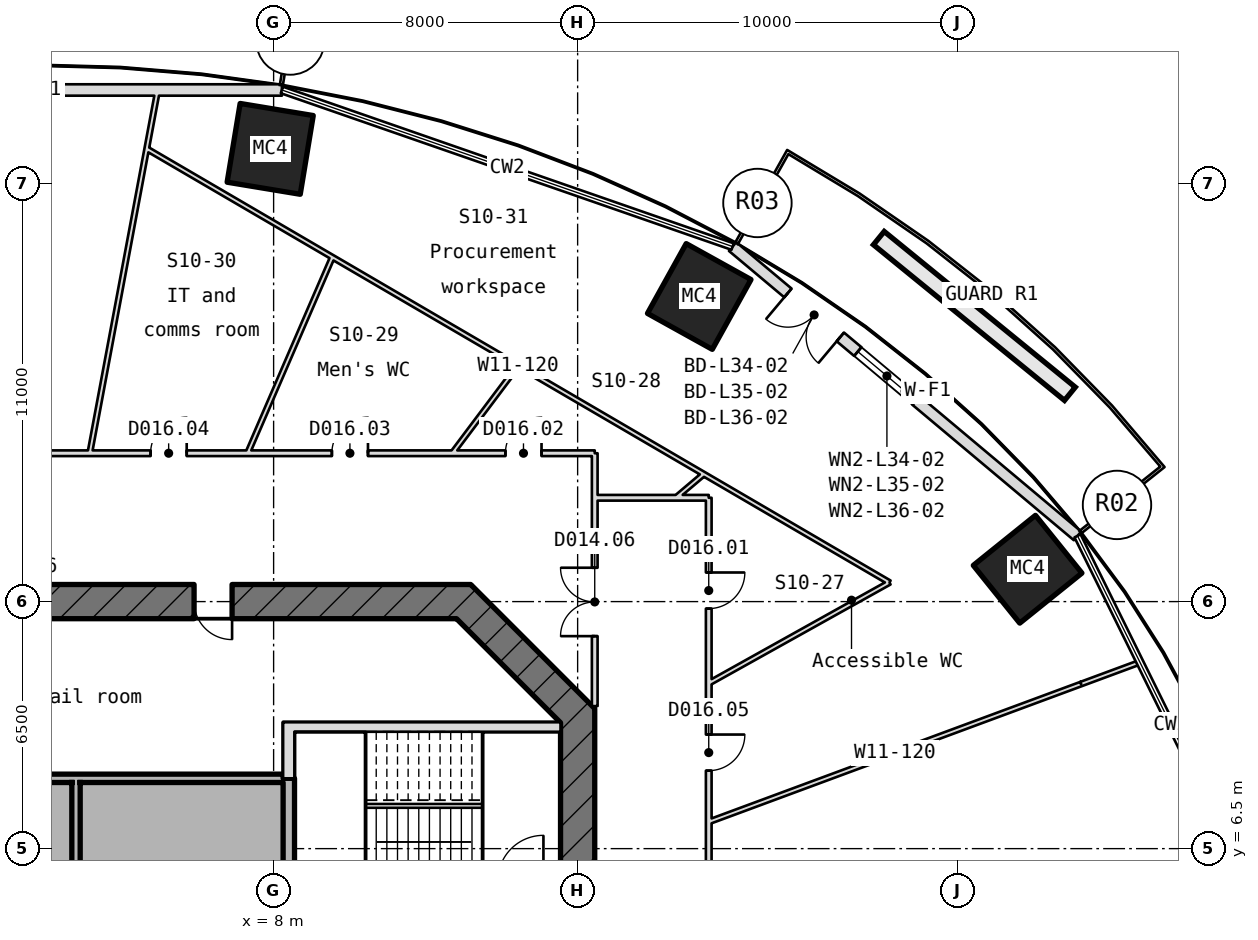
"""IFC4 building model, lengths in metres.
Left out: names, types, materials, properties, quantities, classifications, styles, units other than length and angle.
Written with IfcOpenShell. Run it as: python <this file> out.ifc"""

import sys

from ifc_helpers import new_model, si_unit, direction, frame, frame_2d, origin, origin_2d, place, context, subcontext, project, spatial, rectangle, hollow_rectangle, extrude, element, fill, save


model = new_model("IFC4")
c1 = context("Model", 3, precision=1e-05, world=origin(), true_north=direction((0.0, 1.0)))
c2 = subcontext(c1, "Body", "Model", "MODEL_VIEW")
j1 = project(units=[si_unit("LENGTHUNIT", "METRE"), si_unit("PLANEANGLEUNIT", "RADIAN")], contexts=[c1])
p1 = place(None, origin())
s1 = spatial("IfcSite", under=j1, at=p1, CompositionType="ELEMENT")
p2 = place(p1, origin())
s2 = spatial("IfcBuilding", under=s1, at=p2, CompositionType="ELEMENT")
p3 = place(p2, frame((0.0, 0.0, 161.05)))
s3 = spatial("IfcBuildingStorey", under=s2, at=p3, CompositionType="ELEMENT", Elevation=161.05)
for number, where, z_axis, x_axis in (
    (1, (27.841, 13.852, -0.18), (0.0, 0.0, 1.0), (0.627, -0.779, 0.0)),
    (2, (19.2, 21.028, -0.18), (0.0, 0.0, 1.0), (0.874, -0.485, 0.0)),
    (3, (7.91, 24.912, -0.18), (0.0, 0.0, 1.0), (0.987, -0.163, 0.0)),
):
    element("IfcColumn", number, at=place(p3, frame(where, z_axis=z_axis, x_axis=x_axis)), inside=s3, PredefinedType="COLUMN", context=c2, shape_type="SweptSolid", body=[
        extrude(hollow_rectangle(XDim=1.95, YDim=2.1, WallThickness=0.075, at=origin_2d()), origin(), (0.0, 0.0, 1.0), 4.15),
    ])
p4 = place(p3, frame((29.155, 14.729, 0.0), z_axis=(0.0, 0.0, 1.0), x_axis=(-0.766205617694, 0.642595480387, 0.0)))
e4 = element("IfcWall", 4, at=p4, inside=s3, PredefinedType="SOLIDWALL", context=c2, shape_type="SweptSolid", body=[
    extrude(rectangle(XDim=11.847, YDim=0.3, at=frame_2d((5.923, 0.0))), origin(), (0.0, 0.0, 1.0), 3.97),
])
p5 = place(p4, frame((8.146, 0.0, 0.0)))
e5 = element("IfcOpeningElement", 5, at=p5, cuts=e4, PredefinedType="OPENING", context=c2, shape_type="SweptSolid", body=[
    extrude(rectangle(XDim=1.8, YDim=2.4, at=frame_2d((0.9, 1.2))), frame((0.0, 0.16, 0.0), z_axis=(0.0, -1.0, 0.0), x_axis=(1.0, 0.0, 0.0)), (0.0, 0.0, 1.0), 0.32),
])
p6 = place(p4, frame((5.546, 0.0, 0.9)))
e6 = element("IfcOpeningElement", 6, at=p6, cuts=e4, PredefinedType="OPENING", context=c2, shape_type="SweptSolid", body=[
    extrude(rectangle(XDim=2.0, YDim=1.5, at=frame_2d((1.0, 0.75))), frame((0.0, 0.16, 0.0), z_axis=(0.0, -1.0, 0.0), x_axis=(1.0, 0.0, 0.0)), (0.0, 0.0, 1.0), 0.32),
])
p7 = place(p3, frame((8.218, 26.462, 0.0), z_axis=(0.0, 0.0, 1.0), x_axis=(-1.0, 0.0, 0.0)))
e7 = element("IfcWall", 7, at=p7, inside=s3, PredefinedType="SOLIDWALL", context=c2, shape_type="SweptSolid", body=[
    extrude(rectangle(XDim=12.837, YDim=0.3, at=frame_2d((6.418, 0.0))), origin(), (0.0, 0.0, 1.0), 3.97),
])
p8 = place(p7, frame((9.137, 0.0, 0.0)))
e8 = element("IfcOpeningElement", 8, at=p8, cuts=e7, PredefinedType="OPENING", context=c2, shape_type="SweptSolid", body=[
    extrude(rectangle(XDim=1.8, YDim=2.4, at=frame_2d((0.9, 1.2))), frame((0.0, 0.16, 0.0), z_axis=(0.0, -1.0, 0.0), x_axis=(1.0, 0.0, 0.0)), (0.0, 0.0, 1.0), 0.32),
])
p9 = place(p7, frame((6.537, 0.0, 0.9)))
e9 = element("IfcOpeningElement", 9, at=p9, cuts=e7, PredefinedType="OPENING", context=c2, shape_type="SweptSolid", body=[
    extrude(rectangle(XDim=2.0, YDim=1.5, at=frame_2d((1.0, 0.75))), frame((0.0, 0.16, 0.0), z_axis=(0.0, -1.0, 0.0), x_axis=(1.0, 0.0, 0.0)), (0.0, 0.0, 1.0), 0.32),
])
p10 = place(p3, frame((16.0, -10.186, -0.18), z_axis=(0.0, 0.0, 1.0), x_axis=(0.0, 1.0, 0.0)))
e10 = element("IfcWall", 10, at=p10, inside=s3, PredefinedType="SHEAR", context=c2, shape_type="SweptSolid", body=[
    extrude(rectangle(XDim=20.373, YDim=0.9, at=frame_2d((10.186, 0.0))), origin(), (0.0, 0.0, 1.0), 4.15),
])
p11 = place(p10, frame((8.986, 0.0, 0.18)))
e11 = element("IfcOpeningElement", 11, at=p11, cuts=e10, PredefinedType="OPENING", context=c2, shape_type="SweptSolid", body=[
    extrude(rectangle(XDim=2.4, YDim=2.1, at=frame_2d((1.2, 1.05))), frame((0.0, 0.46, 0.0), z_axis=(0.0, -1.0, 0.0), x_axis=(1.0, 0.0, 0.0)), (0.0, 0.0, 1.0), 0.92),
])
p12 = place(p10, frame((13.586, 0.0, 0.18)))
e12 = element("IfcOpeningElement", 12, at=p12, cuts=e10, PredefinedType="OPENING", context=c2, shape_type="SweptSolid", body=[
    extrude(rectangle(XDim=1.2, YDim=2.1, at=frame_2d((0.6, 1.05))), frame((0.0, 0.46, 0.0), z_axis=(0.0, -1.0, 0.0), x_axis=(1.0, 0.0, 0.0)), (0.0, 0.0, 1.0), 0.92),
])
p13 = place(p3, frame((16.132, 9.868, -0.18), z_axis=(0.0, 0.0, 1.0), x_axis=(-0.707106781187, 0.707106781187, 0.0)))
e13 = element("IfcWall", 13, at=p13, inside=s3, PredefinedType="SHEAR", context=c2, shape_type="SweptSolid", body=[
    extrude(rectangle(XDim=4.615, YDim=0.9, at=frame_2d((2.308, 0.0))), origin(), (0.0, 0.0, 1.0), 4.15),
])
p14 = place(p3, frame((13.186, 13.0, -0.18), z_axis=(0.0, 0.0, 1.0), x_axis=(-1.0, 0.0, 0.0)))
e14 = element("IfcWall", 14, at=p14, inside=s3, PredefinedType="SHEAR", context=c2, shape_type="SweptSolid", body=[
    extrude(rectangle(XDim=26.373, YDim=0.9, at=frame_2d((13.186, 0.0))), origin(), (0.0, 0.0, 1.0), 4.15),
])
p15 = place(p14, frame((19.094, 0.0, 0.18)))
e15 = element("IfcOpeningElement", 15, at=p15, cuts=e14, PredefinedType="OPENING", context=c2, shape_type="SweptSolid", body=[
    extrude(rectangle(XDim=1.0, YDim=2.1, at=frame_2d((0.5, 1.05))), frame((0.0, 0.46, 0.0), z_axis=(0.0, -1.0, 0.0), x_axis=(1.0, 0.0, 0.0)), (0.0, 0.0, 1.0), 0.92),
])
p16 = place(p14, frame((6.279, 0.0, 0.18)))
e16 = element("IfcOpeningElement", 16, at=p16, cuts=e14, PredefinedType="OPENING", context=c2, shape_type="SweptSolid", body=[
    extrude(rectangle(XDim=1.0, YDim=2.1, at=frame_2d((0.5, 1.05))), frame((0.0, 0.46, 0.0), z_axis=(0.0, -1.0, 0.0), x_axis=(1.0, 0.0, 0.0)), (0.0, 0.0, 1.0), 0.92),
])
p17 = place(p3, frame((-8.25, 8.35, 0.0), z_axis=(0.0, 0.0, 1.0), x_axis=(1.0, 0.0, 0.0)))
e17 = element("IfcWall", 17, at=p17, inside=s3, PredefinedType="STANDARD", context=c2, shape_type="SweptSolid", body=[
    extrude(rectangle(XDim=16.5, YDim=0.22, at=frame_2d((8.25, 0.0))), origin(), (0.0, 0.0, 1.0), 3.97),
])
p18 = place(p3, frame((8.55, 9.7, -0.18), z_axis=(0.0, 0.0, 1.0), x_axis=(1.0, 0.0, 0.0)))
e18 = element("IfcWall", 18, at=p18, inside=s3, PredefinedType="SHEAR", context=c2, shape_type="SweptSolid", body=[
    extrude(rectangle(XDim=7.0, YDim=0.25, at=frame_2d((3.5, 0.0))), origin(), (0.0, 0.0, 1.0), 4.15),
])
p19 = place(p3, frame((2.8, 5.46, 0.0), z_axis=(0.0, 0.0, 1.0), x_axis=(0.0, 1.0, 0.0)))
e19 = element("IfcWall", 19, at=p19, inside=s3, PredefinedType="STANDARD", context=c2, shape_type="SweptSolid", body=[
    extrude(rectangle(XDim=2.78, YDim=0.22, at=frame_2d((1.39, 0.0))), origin(), (0.0, 0.0, 1.0), 3.97),
])
p20 = place(p3, frame((8.4, 5.24, -0.18), z_axis=(0.0, 0.0, 1.0), x_axis=(0.0, 1.0, 0.0)))
e20 = element("IfcWall", 20, at=p20, inside=s3, PredefinedType="SHEAR", context=c2, shape_type="SweptSolid", body=[
    extrude(rectangle(XDim=3.11, YDim=0.3, at=frame_2d((1.555, 0.0))), origin(), (0.0, 0.0, 1.0), 4.15),
])
p21 = place(p3, frame((8.4, 8.35, -0.18), z_axis=(0.0, 0.0, 1.0), x_axis=(0.0, 1.0, 0.0)))
e21 = element("IfcWall", 21, at=p21, inside=s3, PredefinedType="SHEAR", context=c2, shape_type="SweptSolid", body=[
    extrude(rectangle(XDim=1.475, YDim=0.3, at=frame_2d((0.737, 0.0))), origin(), (0.0, 0.0, 1.0), 4.15),
])
p22 = place(p3, frame((-16.45, 16.904, 0.0), z_axis=(0.0, 0.0, 1.0), x_axis=(1.0, 0.0, 0.0)))
e22 = element("IfcWall", 22, at=p22, inside=s3, PredefinedType="PARTITIONING", context=c2, shape_type="SweptSolid", body=[
    extrude(rectangle(XDim=32.9, YDim=0.15, at=frame_2d((16.45, 0.0))), origin(), (0.0, 0.0, 1.0), 3.97),
])
p23 = place(p22, frame((30.55, 0.0, 0.0)))
e23 = element("IfcOpeningElement", 23, at=p23, cuts=e22, PredefinedType="OPENING", context=c2, shape_type="SweptSolid", body=[
    extrude(rectangle(XDim=0.95, YDim=2.1, at=frame_2d((0.475, 1.05))), frame((0.0, 0.085, 0.0), z_axis=(0.0, -1.0, 0.0), x_axis=(1.0, 0.0, 0.0)), (0.0, 0.0, 1.0), 0.17),
])
p24 = place(p22, frame((25.983, 0.0, 0.0)))
e24 = element("IfcOpeningElement", 24, at=p24, cuts=e22, PredefinedType="OPENING", context=c2, shape_type="SweptSolid", body=[
    extrude(rectangle(XDim=0.95, YDim=2.1, at=frame_2d((0.475, 1.05))), frame((0.0, 0.085, 0.0), z_axis=(0.0, -1.0, 0.0), x_axis=(1.0, 0.0, 0.0)), (0.0, 0.0, 1.0), 0.17),
])
p25 = place(p22, frame((21.213, 0.0, 0.0)))
e25 = element("IfcOpeningElement", 25, at=p25, cuts=e22, PredefinedType="OPENING", context=c2, shape_type="SweptSolid", body=[
    extrude(rectangle(XDim=0.95, YDim=2.1, at=frame_2d((0.475, 1.05))), frame((0.0, 0.085, 0.0), z_axis=(0.0, -1.0, 0.0), x_axis=(1.0, 0.0, 0.0)), (0.0, 0.0, 1.0), 0.17),
])
p26 = place(p22, frame((8.906, 0.0, 0.0)))
e26 = element("IfcOpeningElement", 26, at=p26, cuts=e22, PredefinedType="OPENING", context=c2, shape_type="SweptSolid", body=[
    extrude(rectangle(XDim=1.8, YDim=2.1, at=frame_2d((0.9, 1.05))), frame((0.0, 0.085, 0.0), z_axis=(0.0, -1.0, 0.0), x_axis=(1.0, 0.0, 0.0)), (0.0, 0.0, 1.0), 0.17),
])
p27 = place(p3, frame((3.162, 16.904, 0.0), z_axis=(0.0, 0.0, 1.0), x_axis=(0.183861029676, 0.982952247958, 0.0)))
e27 = element("IfcWall", 27, at=p27, inside=s3, PredefinedType="PARTITIONING", context=c2, shape_type="SweptSolid", body=[
    extrude(rectangle(XDim=9.724, YDim=0.12, at=frame_2d((4.862, 0.0))), origin(), (0.0, 0.0, 1.0), 3.97),
])
p28 = place(p3, frame((9.547, 22.062, 0.0), z_axis=(0.0, 0.0, 1.0), x_axis=(-0.397156395758, -0.917750945142, 0.0)))
e28 = element("IfcWall", 28, at=p28, inside=s3, PredefinedType="PARTITIONING", context=c2, shape_type="SweptSolid", body=[
    extrude(rectangle(XDim=5.621, YDim=0.12, at=frame_2d((2.811, 0.0))), origin(), (0.0, 0.0, 1.0), 3.97),
])
p29 = place(p3, frame((14.433, 19.209, 0.0), z_axis=(0.0, 0.0, 1.0), x_axis=(-0.600731295076, -0.799451006076, 0.0)))
e29 = element("IfcWall", 29, at=p29, inside=s3, PredefinedType="PARTITIONING", context=c2, shape_type="SweptSolid", body=[
    extrude(rectangle(XDim=2.884, YDim=0.12, at=frame_2d((1.442, 0.0))), origin(), (0.0, 0.0, 1.0), 3.97),
])
p30 = place(p3, frame((16.45, 10.25, 0.0), z_axis=(0.0, 0.0, 1.0), x_axis=(0.0, 1.0, 0.0)))
e30 = element("IfcWall", 30, at=p30, inside=s3, PredefinedType="PARTITIONING", context=c2, shape_type="SweptSolid", body=[
    extrude(rectangle(XDim=6.654, YDim=0.15, at=frame_2d((3.327, 0.0))), origin(), (0.0, 0.0, 1.0), 3.97),
])
p31 = place(p30, frame((1.841, 0.0, 0.0)))
e31 = element("IfcOpeningElement", 31, at=p31, cuts=e30, PredefinedType="OPENING", context=c2, shape_type="SweptSolid", body=[
    extrude(rectangle(XDim=1.8, YDim=2.1, at=frame_2d((0.9, 1.05))), frame((0.0, 0.085, 0.0), z_axis=(0.0, -1.0, 0.0), x_axis=(1.0, 0.0, 0.0)), (0.0, 0.0, 1.0), 0.17),
])
p32 = place(p3, frame((16.45, 15.732, 0.0), z_axis=(0.0, 0.0, 1.0), x_axis=(1.0, 0.0, 0.0)))
e32 = element("IfcWall", 32, at=p32, inside=s3, PredefinedType="PARTITIONING", context=c2, shape_type="SweptSolid", body=[
    extrude(rectangle(XDim=3.0, YDim=0.15, at=frame_2d((1.5, 0.0))), origin(), (0.0, 0.0, 1.0), 3.97),
])
p33 = place(p3, frame((19.319, 16.356, 0.0), z_axis=(0.0, 0.0, 1.0), x_axis=(-0.763098484836, -0.646282215786, 0.0)))
e33 = element("IfcWall", 33, at=p33, inside=s3, PredefinedType="PARTITIONING", context=c2, shape_type="SweptSolid", body=[
    extrude(rectangle(XDim=0.966, YDim=0.12, at=frame_2d((0.483, 0.0))), origin(), (0.0, 0.0, 1.0), 3.97),
])
p34 = place(p3, frame((19.45, 7.203, 0.0), z_axis=(0.0, 0.0, 1.0), x_axis=(0.937756089428, 0.347294567682, 0.0)))
e34 = element("IfcWall", 34, at=p34, inside=s3, PredefinedType="PARTITIONING", context=c2, shape_type="SweptSolid", body=[
    extrude(rectangle(XDim=10.448, YDim=0.12, at=frame_2d((5.224, 0.0))), origin(), (0.0, 0.0, 1.0), 3.358),
])
p35 = place(p3, frame((29.247, 10.831, 0.0), z_axis=(0.0, 0.0, 1.0), x_axis=(0.937796889534, 0.347184380381, 0.0)))
e35 = element("IfcWall", 35, at=p35, inside=s3, PredefinedType="PARTITIONING", context=c2, shape_type="SweptSolid", body=[
    extrude(rectangle(XDim=1.652, YDim=0.12, at=frame_2d((0.826, 0.0))), origin(), (0.0, 0.0, 1.0), 3.97),
])
p36 = place(p3, frame((19.45, 15.732, 0.0), z_axis=(0.0, 0.0, 1.0), x_axis=(0.0, -1.0, 0.0)))
e36 = element("IfcWall", 36, at=p36, inside=s3, PredefinedType="PARTITIONING", context=c2, shape_type="SweptSolid", body=[
    extrude(rectangle(XDim=31.582, YDim=0.15, at=frame_2d((15.791, 0.0))), origin(), (0.0, 0.0, 1.0), 3.97),
])
p37 = place(p36, frame((1.966, 0.0, 0.0)))
e37 = element("IfcOpeningElement", 37, at=p37, cuts=e36, PredefinedType="OPENING", context=c2, shape_type="SweptSolid", body=[
    extrude(rectangle(XDim=0.95, YDim=2.1, at=frame_2d((0.475, 1.05))), frame((0.0, 0.085, 0.0), z_axis=(0.0, -1.0, 0.0), x_axis=(1.0, 0.0, 0.0)), (0.0, 0.0, 1.0), 0.17),
])
p38 = place(p36, frame((6.23, 0.0, 0.0)))
e38 = element("IfcOpeningElement", 38, at=p38, cuts=e36, PredefinedType="OPENING", context=c2, shape_type="SweptSolid", body=[
    extrude(rectangle(XDim=0.95, YDim=2.1, at=frame_2d((0.475, 1.05))), frame((0.0, 0.085, 0.0), z_axis=(0.0, -1.0, 0.0), x_axis=(1.0, 0.0, 0.0)), (0.0, 0.0, 1.0), 0.17),
])
p39 = place(p36, frame((16.255, 0.0, 0.0)))
e39 = element("IfcOpeningElement", 39, at=p39, cuts=e36, PredefinedType="OPENING", context=c2, shape_type="SweptSolid", body=[
    extrude(rectangle(XDim=1.8, YDim=2.1, at=frame_2d((0.9, 1.05))), frame((0.0, 0.085, 0.0), z_axis=(0.0, -1.0, 0.0), x_axis=(1.0, 0.0, 0.0)), (0.0, 0.0, 1.0), 0.17),
])
p40 = place(p3, frame((24.206, 13.502, 0.0), z_axis=(0.0, 0.0, 1.0), x_axis=(-0.863538195042, 0.504283437864, 0.0)))
e40 = element("IfcWall", 40, at=p40, inside=s3, PredefinedType="PARTITIONING", context=c2, shape_type="SweptSolid", body=[
    extrude(rectangle(XDim=22.633, YDim=0.12, at=frame_2d((11.317, 0.0))), origin(), (0.0, 0.0, 1.0), 3.97),
])
p41 = place(p3, frame((24.206, 13.502, 0.0), z_axis=(0.0, 0.0, 1.0), x_axis=(-0.873312155931, -0.487161039394, 0.0)))
e41 = element("IfcWall", 41, at=p41, inside=s3, PredefinedType="PARTITIONING", context=c2, shape_type="SweptSolid", body=[
    extrude(rectangle(XDim=5.446, YDim=0.12, at=frame_2d((2.723, 0.0))), origin(), (0.0, 0.0, 1.0), 3.97),
])
p42 = place(p5, origin())
e42 = element("IfcDoor", 42, at=p42, inside=s3, OperationType="SINGLE_SWING_LEFT", PredefinedType="DOOR", context=c2, shape_type="SweptSolid", body=[
    extrude(rectangle(XDim=1.8, YDim=2.4, at=frame_2d((0.9, 1.2))), frame((0.0, 0.025, 0.0), z_axis=(0.0, -1.0, 0.0), x_axis=(1.0, 0.0, 0.0)), (0.0, 0.0, 1.0), 0.05),
])
fill(e5, e42)
p43 = place(p6, origin())
e43 = element("IfcWindow", 43, at=p43, inside=s3, PartitioningType="SINGLE_PANEL", PredefinedType="WINDOW", context=c2, shape_type="SweptSolid", body=[
    extrude(rectangle(XDim=2.0, YDim=1.5, at=frame_2d((1.0, 0.75))), frame((0.0, 0.03, 0.0), z_axis=(0.0, -1.0, 0.0), x_axis=(1.0, 0.0, 0.0)), (0.0, 0.0, 1.0), 0.06),
])
fill(e6, e43)
p44 = place(p16, origin())
e44 = element("IfcDoor", 44, at=p44, inside=s3, OperationType="SINGLE_SWING_RIGHT", PredefinedType="DOOR", context=c2, shape_type="SweptSolid", body=[
    extrude(rectangle(XDim=1.0, YDim=2.1, at=frame_2d((0.5, 1.05))), frame((0.0, 0.025, 0.0), z_axis=(0.0, -1.0, 0.0), x_axis=(1.0, 0.0, 0.0)), (0.0, 0.0, 1.0), 0.05),
])
fill(e16, e44)
p45 = place(p37, origin())
e45 = element("IfcDoor", 45, at=p45, inside=s3, OperationType="SINGLE_SWING_RIGHT", PredefinedType="DOOR", context=c2, shape_type="SweptSolid", body=[
    extrude(rectangle(XDim=0.95, YDim=2.1, at=frame_2d((0.475, 1.05))), frame((0.0, 0.025, 0.0), z_axis=(0.0, -1.0, 0.0), x_axis=(1.0, 0.0, 0.0)), (0.0, 0.0, 1.0), 0.05),
])
fill(e37, e45)
p46 = place(p23, origin())
e46 = element("IfcDoor", 46, at=p46, inside=s3, OperationType="SINGLE_SWING_RIGHT", PredefinedType="DOOR", context=c2, shape_type="SweptSolid", body=[
    extrude(rectangle(XDim=0.95, YDim=2.1, at=frame_2d((0.475, 1.05))), frame((0.0, 0.025, 0.0), z_axis=(0.0, -1.0, 0.0), x_axis=(1.0, 0.0, 0.0)), (0.0, 0.0, 1.0), 0.05),
])
fill(e23, e46)
p47 = place(p24, origin())
e47 = element("IfcDoor", 47, at=p47, inside=s3, OperationType="SINGLE_SWING_RIGHT", PredefinedType="DOOR", context=c2, shape_type="SweptSolid", body=[
    extrude(rectangle(XDim=0.95, YDim=2.1, at=frame_2d((0.475, 1.05))), frame((0.0, 0.025, 0.0), z_axis=(0.0, -1.0, 0.0), x_axis=(1.0, 0.0, 0.0)), (0.0, 0.0, 1.0), 0.05),
])
fill(e24, e47)
p48 = place(p25, origin())
e48 = element("IfcDoor", 48, at=p48, inside=s3, OperationType="SINGLE_SWING_RIGHT", PredefinedType="DOOR", context=c2, shape_type="SweptSolid", body=[
    extrude(rectangle(XDim=0.95, YDim=2.1, at=frame_2d((0.475, 1.05))), frame((0.0, 0.025, 0.0), z_axis=(0.0, -1.0, 0.0), x_axis=(1.0, 0.0, 0.0)), (0.0, 0.0, 1.0), 0.05),
])
fill(e25, e48)
p49 = place(p38, origin())
e49 = element("IfcDoor", 49, at=p49, inside=s3, OperationType="SINGLE_SWING_RIGHT", PredefinedType="DOOR", context=c2, shape_type="SweptSolid", body=[
    extrude(rectangle(XDim=0.95, YDim=2.1, at=frame_2d((0.475, 1.05))), frame((0.0, 0.025, 0.0), z_axis=(0.0, -1.0, 0.0), x_axis=(1.0, 0.0, 0.0)), (0.0, 0.0, 1.0), 0.05),
])
fill(e38, e49)
p50 = place(p31, origin())
e50 = element("IfcDoor", 50, at=p50, inside=s3, OperationType="DOUBLE_DOOR_SINGLE_SWING", PredefinedType="DOOR", context=c2, shape_type="SweptSolid", body=[
    extrude(rectangle(XDim=1.8, YDim=2.1, at=frame_2d((0.9, 1.05))), frame((0.0, 0.025, 0.0), z_axis=(0.0, -1.0, 0.0), x_axis=(1.0, 0.0, 0.0)), (0.0, 0.0, 1.0), 0.05),
])
fill(e31, e50)
save(model, sys.argv[1])
